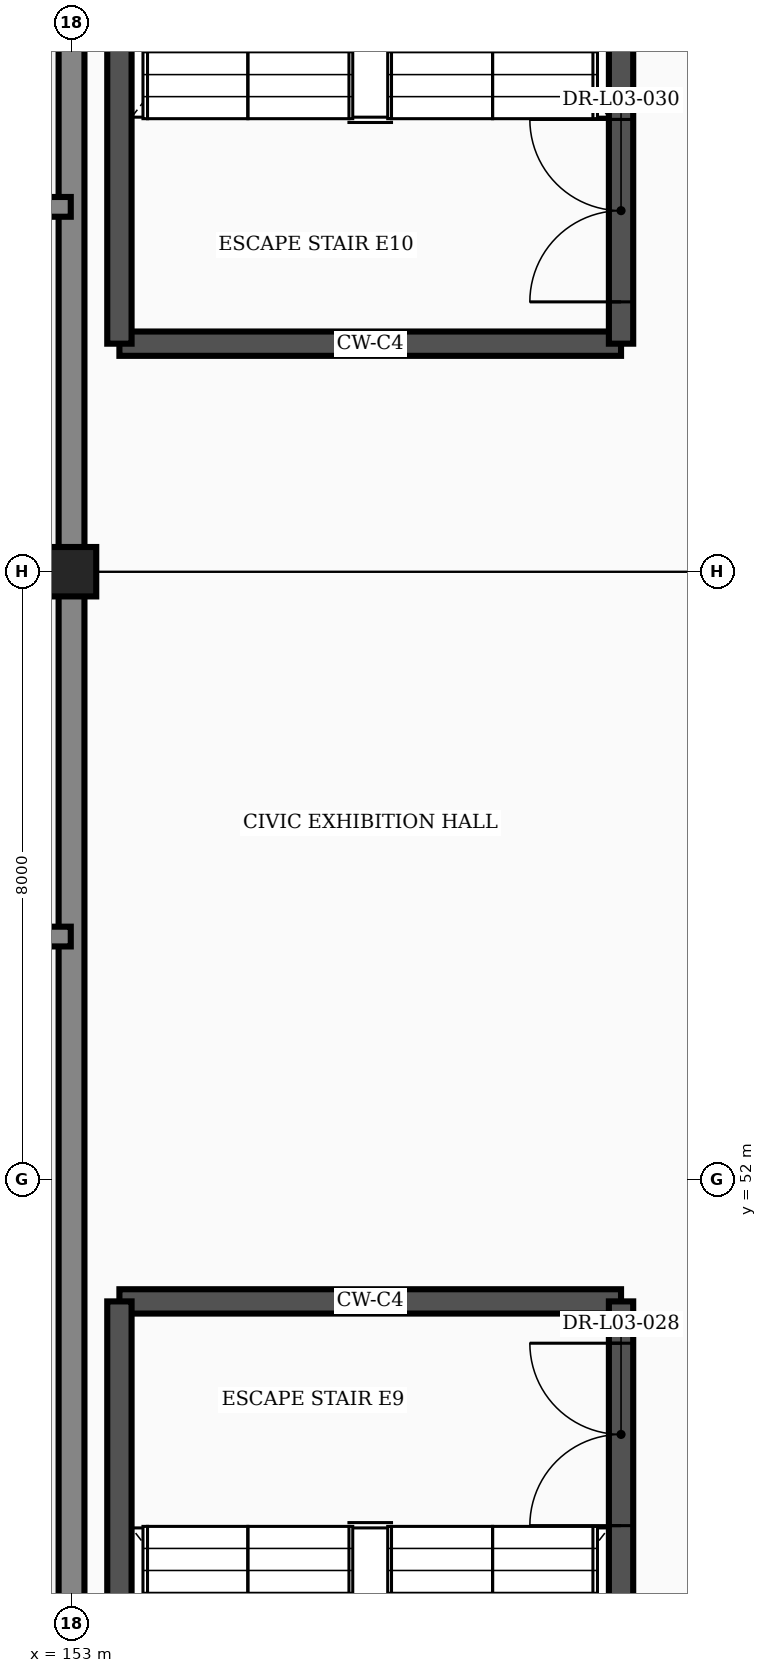
"""IFC4 building model, lengths in metres.
Left out: names, types, materials, properties, quantities, classifications, styles, units other than length and angle.
Written with IfcOpenShell. Run it as: python <this file> out.ifc"""

import sys

from ifc_helpers import new_model, si_unit, direction, frame, frame_2d, origin, origin_2d, place, context, subcontext, project, spatial, rectangle, extrude, element, fill, save


model = new_model("IFC4")
c1 = context("Model", 3, precision=1e-05, world=origin(), true_north=direction((0.0, 1.0)))
c2 = subcontext(c1, "Body", "Model", "MODEL_VIEW")
j1 = project(units=[si_unit("LENGTHUNIT", "METRE"), si_unit("PLANEANGLEUNIT", "RADIAN")], contexts=[c1])
p1 = place(None, origin())
s1 = spatial("IfcSite", under=j1, at=p1, CompositionType="ELEMENT")
p2 = place(p1, origin())
s2 = spatial("IfcBuilding", under=s1, at=p2, CompositionType="ELEMENT")
p3 = place(p2, frame((0.0, 0.0, 16.8)))
s3 = spatial("IfcBuildingStorey", under=s2, at=p3, CompositionType="ELEMENT", Elevation=16.8)
p4 = place(p3, frame((153.0, 60.0, 0.0), z_axis=(0.0, 0.0, 1.0), x_axis=(1.0, 0.0, 0.0)))
e1 = element("IfcColumn", 1, at=p4, inside=s3, PredefinedType="COLUMN", context=c2, shape_type="SweptSolid", body=[
    extrude(rectangle(XDim=0.65, YDim=0.65, at=origin_2d()), origin(), (0.0, 0.0, 1.0), 4.8),
])
for number, where, z_axis, x_axis in (
    (2, (153.0, 36.198, 0.0), (0.0, 0.0, 1.0), (0.0, 1.0, 0.0)),
    (3, (153.0, 60.317, 0.0), (0.0, 0.0, 1.0), (0.0, 1.0, 0.0)),
):
    element("IfcWall", number, at=place(p3, frame(where, z_axis=z_axis, x_axis=x_axis)), inside=s3, PredefinedType="STANDARD", context=c2, shape_type="SweptSolid", body=[
        extrude(rectangle(XDim=23.485, YDim=0.34, at=frame_2d((11.742, 0.0))), origin(), (0.0, 0.0, 1.0), 3.423),
    ])
p5 = place(p3, frame((135.0, 55.2, 4.005), z_axis=(0.0, 0.0, 1.0), x_axis=(1.0, 0.0, 0.0)))
e4 = element("IfcWall", 4, at=p5, inside=s3, PredefinedType="STANDARD", context=c2, shape_type="SweptSolid", body=[
    extrude(rectangle(XDim=17.99, YDim=0.26, at=frame_2d((8.995, 0.0))), origin(), (0.0, 0.0, 1.0), 2.049),
])
p6 = place(p5, frame((7.795, 0.0, 0.32)))
e5 = element("IfcOpeningElement", 5, at=p6, cuts=e4, PredefinedType="OPENING", context=c2, shape_type="SweptSolid", body=[
    extrude(rectangle(XDim=2.4, YDim=1.35, at=frame_2d((1.2, 0.675))), frame((0.0, 0.142, 0.0), z_axis=(0.0, -1.0, 0.0), x_axis=(1.0, 0.0, 0.0)), (0.0, 0.0, 1.0), 0.284),
])
p7 = place(p3, frame((135.0, 64.8, 4.005), z_axis=(0.0, 0.0, 1.0), x_axis=(1.0, 0.0, 0.0)))
e6 = element("IfcWall", 6, at=p7, inside=s3, PredefinedType="STANDARD", context=c2, shape_type="SweptSolid", body=[
    extrude(rectangle(XDim=17.99, YDim=0.26, at=frame_2d((8.995, 0.0))), origin(), (0.0, 0.0, 1.0), 2.049),
])
p8 = place(p7, frame((7.195, 0.0, 0.32)))
e7 = element("IfcOpeningElement", 7, at=p8, cuts=e6, PredefinedType="OPENING", context=c2, shape_type="SweptSolid", body=[
    extrude(rectangle(XDim=3.6, YDim=1.35, at=frame_2d((1.8, 0.675))), frame((0.0, 0.142, 0.0), z_axis=(0.0, -1.0, 0.0), x_axis=(1.0, 0.0, 0.0)), (0.0, 0.0, 1.0), 0.284),
])
p9 = place(p3, frame((153.63, 50.4, 0.0), z_axis=(0.0, 0.0, 1.0), x_axis=(1.0, 0.0, 0.0)))
e8 = element("IfcWall", 8, at=p9, inside=s3, PredefinedType="SHEAR", context=c2, shape_type="SweptSolid", body=[
    extrude(rectangle(XDim=6.6, YDim=0.32, at=frame_2d((3.3, 0.0))), origin(), (0.0, 0.0, 1.0), 4.555),
])
p10 = place(p3, frame((153.63, 39.2, 0.0), z_axis=(0.0, 0.0, 1.0), x_axis=(0.0, 1.0, 0.0)))
e9 = element("IfcWall", 9, at=p10, inside=s3, PredefinedType="SHEAR", context=c2, shape_type="SweptSolid", body=[
    extrude(rectangle(XDim=11.2, YDim=0.32, at=frame_2d((5.6, 0.0))), origin(), (0.0, 0.0, 1.0), 4.555),
])
p11 = place(p3, frame((160.23, 39.2, 0.0), z_axis=(0.0, 0.0, 1.0), x_axis=(0.0, 1.0, 0.0)))
e10 = element("IfcWall", 10, at=p11, inside=s3, PredefinedType="SHEAR", context=c2, shape_type="SweptSolid", body=[
    extrude(rectangle(XDim=11.2, YDim=0.32, at=frame_2d((5.6, 0.0))), origin(), (0.0, 0.0, 1.0), 4.555),
])
p12 = place(p11, frame((8.25, 0.0, 0.0)))
e11 = element("IfcOpeningElement", 11, at=p12, cuts=e10, PredefinedType="OPENING", context=c2, shape_type="SweptSolid", body=[
    extrude(rectangle(XDim=2.4, YDim=2.25, at=frame_2d((1.2, 1.125))), frame((0.0, 0.172, 0.0), z_axis=(0.0, -1.0, 0.0), x_axis=(1.0, 0.0, 0.0)), (0.0, 0.0, 1.0), 0.344),
])
p13 = place(p3, frame((153.63, 63.0, 0.0), z_axis=(0.0, 0.0, 1.0), x_axis=(1.0, 0.0, 0.0)))
e12 = element("IfcWall", 12, at=p13, inside=s3, PredefinedType="SHEAR", context=c2, shape_type="SweptSolid", body=[
    extrude(rectangle(XDim=6.6, YDim=0.32, at=frame_2d((3.3, 0.0))), origin(), (0.0, 0.0, 1.0), 4.555),
])
p14 = place(p3, frame((153.63, 63.0, 0.0), z_axis=(0.0, 0.0, 1.0), x_axis=(0.0, 1.0, 0.0)))
e13 = element("IfcWall", 13, at=p14, inside=s3, PredefinedType="SHEAR", context=c2, shape_type="SweptSolid", body=[
    extrude(rectangle(XDim=11.2, YDim=0.32, at=frame_2d((5.6, 0.0))), origin(), (0.0, 0.0, 1.0), 4.555),
])
p15 = place(p3, frame((160.23, 63.0, 0.0), z_axis=(0.0, 0.0, 1.0), x_axis=(0.0, 1.0, 0.0)))
e14 = element("IfcWall", 14, at=p15, inside=s3, PredefinedType="SHEAR", context=c2, shape_type="SweptSolid", body=[
    extrude(rectangle(XDim=11.2, YDim=0.32, at=frame_2d((5.6, 0.0))), origin(), (0.0, 0.0, 1.0), 4.555),
])
p16 = place(p15, frame((0.55, 0.0, 0.0)))
e15 = element("IfcOpeningElement", 15, at=p16, cuts=e14, PredefinedType="OPENING", context=c2, shape_type="SweptSolid", body=[
    extrude(rectangle(XDim=2.4, YDim=2.25, at=frame_2d((1.2, 1.125))), frame((0.0, 0.172, 0.0), z_axis=(0.0, -1.0, 0.0), x_axis=(1.0, 0.0, 0.0)), (0.0, 0.0, 1.0), 0.344),
])
p17 = place(p12, origin())
e16 = element("IfcDoor", 16, at=p17, inside=s3, OperationType="DOUBLE_DOOR_SINGLE_SWING", PredefinedType="DOOR", context=c2, shape_type="SweptSolid", body=[
    extrude(rectangle(XDim=2.4, YDim=2.25, at=frame_2d((1.2, 1.125))), frame((0.0, 0.025, 0.0), z_axis=(0.0, -1.0, 0.0), x_axis=(1.0, 0.0, 0.0)), (0.0, 0.0, 1.0), 0.05),
])
fill(e11, e16)
p18 = place(p16, origin())
e17 = element("IfcDoor", 17, at=p18, inside=s3, OperationType="DOUBLE_DOOR_SINGLE_SWING", PredefinedType="DOOR", context=c2, shape_type="SweptSolid", body=[
    extrude(rectangle(XDim=2.4, YDim=2.25, at=frame_2d((1.2, 1.125))), frame((0.0, 0.025, 0.0), z_axis=(0.0, -1.0, 0.0), x_axis=(1.0, 0.0, 0.0)), (0.0, 0.0, 1.0), 0.05),
])
fill(e15, e17)
save(model, sys.argv[1])
